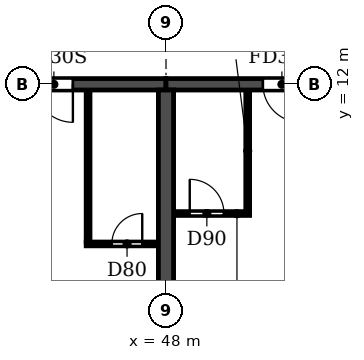
"""IFC4 building model, lengths in metres.
Left out: names, types, materials, properties, quantities, classifications, styles, units other than length and angle.
Written with IfcOpenShell. Run it as: python <this file> out.ifc"""

import sys

from ifc_helpers import new_model, si_unit, direction, frame, frame_2d, origin, place, context, subcontext, project, spatial, rectangle, extrude, element, fill, save


model = new_model("IFC4")
c1 = context("Model", 3, precision=1e-05, world=origin(), true_north=direction((0.0, 1.0)))
c2 = subcontext(c1, "Body", "Model", "MODEL_VIEW")
j1 = project(units=[si_unit("LENGTHUNIT", "METRE"), si_unit("PLANEANGLEUNIT", "RADIAN")], contexts=[c1])
p1 = place(None, origin())
s1 = spatial("IfcSite", under=j1, at=p1, CompositionType="ELEMENT")
p2 = place(p1, origin())
s2 = spatial("IfcBuilding", under=s1, at=p2, CompositionType="ELEMENT")
p3 = place(p2, frame((0.0, 0.0, 33.3)))
s3 = spatial("IfcBuildingStorey", under=s2, at=p3, CompositionType="ELEMENT", Elevation=33.3)
p4 = place(p3, frame((48.0, 0.2, 0.0), z_axis=(0.0, 0.0, 1.0), x_axis=(0.0, 1.0, 0.0)))
e1 = element("IfcWall", 1, at=p4, inside=s3, PredefinedType="SHEAR", context=c2, shape_type="SweptSolid", body=[
    extrude(rectangle(XDim=11.65, YDim=0.4, at=frame_2d((5.825, 0.0))), origin(), (0.0, 0.0, 1.0), 3.05),
])
p5 = place(p3, frame((42.0, 12.0, 0.0), z_axis=(0.0, 0.0, 1.0), x_axis=(1.0, 0.0, 0.0)))
e2 = element("IfcWall", 2, at=p5, inside=s3, PredefinedType="SHEAR", context=c2, shape_type="SweptSolid", body=[
    extrude(rectangle(XDim=6.0, YDim=0.3, at=frame_2d((3.0, 0.0))), origin(), (0.0, 0.0, 1.0), 2.45),
])
p6 = place(p5, frame((2.55, 0.0, 0.0)))
e3 = element("IfcOpeningElement", 3, at=p6, cuts=e2, PredefinedType="OPENING", context=c2, shape_type="SweptSolid", body=[
    extrude(rectangle(XDim=1.0, YDim=2.1, at=frame_2d((0.5, 1.05))), frame((0.0, 0.16, 0.0), z_axis=(0.0, -1.0, 0.0), x_axis=(1.0, 0.0, 0.0)), (0.0, 0.0, 1.0), 0.32),
])
p7 = place(p3, frame((48.0, 12.0, 0.0), z_axis=(0.0, 0.0, 1.0), x_axis=(1.0, 0.0, 0.0)))
e4 = element("IfcWall", 4, at=p7, inside=s3, PredefinedType="SHEAR", context=c2, shape_type="SweptSolid", body=[
    extrude(rectangle(XDim=6.0, YDim=0.3, at=frame_2d((3.0, 0.0))), origin(), (0.0, 0.0, 1.0), 2.45),
])
p8 = place(p7, frame((2.55, 0.0, 0.0)))
e5 = element("IfcOpeningElement", 5, at=p8, cuts=e4, PredefinedType="OPENING", context=c2, shape_type="SweptSolid", body=[
    extrude(rectangle(XDim=1.0, YDim=2.1, at=frame_2d((0.5, 1.05))), frame((0.0, 0.16, 0.0), z_axis=(0.0, -1.0, 0.0), x_axis=(1.0, 0.0, 0.0)), (0.0, 0.0, 1.0), 0.32),
])
p9 = place(p3, frame((45.9, 7.8, 0.0), z_axis=(0.0, 0.0, 1.0), x_axis=(1.0, 0.0, 0.0)))
e6 = element("IfcWall", 6, at=p9, inside=s3, PredefinedType="PARTITIONING", context=c2, shape_type="SweptSolid", body=[
    extrude(rectangle(XDim=1.89, YDim=0.1, at=frame_2d((0.945, 0.0))), origin(), (0.0, 0.0, 1.0), 3.05),
])
p10 = place(p9, frame((0.675, 0.0, 0.0)))
e7 = element("IfcOpeningElement", 7, at=p10, cuts=e6, PredefinedType="OPENING", context=c2, shape_type="SweptSolid", body=[
    extrude(rectangle(XDim=0.8, YDim=2.1, at=frame_2d((0.4, 1.05))), frame((0.0, 0.06, 0.0), z_axis=(0.0, -1.0, 0.0), x_axis=(1.0, 0.0, 0.0)), (0.0, 0.0, 1.0), 0.12),
])
p11 = place(p3, frame((48.21, 8.6, 0.0), z_axis=(0.0, 0.0, 1.0), x_axis=(1.0, 0.0, 0.0)))
e8 = element("IfcWall", 8, at=p11, inside=s3, PredefinedType="PARTITIONING", context=c2, shape_type="SweptSolid", body=[
    extrude(rectangle(XDim=1.99, YDim=0.1, at=frame_2d((0.995, 0.0))), origin(), (0.0, 0.0, 1.0), 3.05),
])
p12 = place(p11, frame((0.415, 0.0, 0.0)))
e9 = element("IfcOpeningElement", 9, at=p12, cuts=e8, PredefinedType="OPENING", context=c2, shape_type="SweptSolid", body=[
    extrude(rectangle(XDim=0.9, YDim=2.1, at=frame_2d((0.45, 1.05))), frame((0.0, 0.06, 0.0), z_axis=(0.0, -1.0, 0.0), x_axis=(1.0, 0.0, 0.0)), (0.0, 0.0, 1.0), 0.12),
])
p13 = place(p3, frame((45.95, 7.85, 0.0), z_axis=(0.0, 0.0, 1.0), x_axis=(0.0, 1.0, 0.0)))
e10 = element("IfcWall", 10, at=p13, inside=s3, PredefinedType="PARTITIONING", context=c2, shape_type="SweptSolid", body=[
    extrude(rectangle(XDim=3.99, YDim=0.1, at=frame_2d((1.995, 0.0))), origin(), (0.0, 0.0, 1.0), 3.05),
])
p14 = place(p3, frame((50.15, 8.65, 0.0), z_axis=(0.0, 0.0, 1.0), x_axis=(0.0, 1.0, 0.0)))
e11 = element("IfcWall", 11, at=p14, inside=s3, PredefinedType="PARTITIONING", context=c2, shape_type="SweptSolid", body=[
    extrude(rectangle(XDim=3.19, YDim=0.1, at=frame_2d((1.595, 0.0))), origin(), (0.0, 0.0, 1.0), 3.05),
])
p15 = place(p6, frame((1.0, 0.0, 0.0), z_axis=(0.0, 0.0, 1.0), x_axis=(-1.0, 0.0, 0.0)))
e12 = element("IfcDoor", 12, at=p15, inside=s3, OperationType="SINGLE_SWING_LEFT", PredefinedType="DOOR", context=c2, shape_type="SweptSolid", body=[
    extrude(rectangle(XDim=1.0, YDim=2.1, at=frame_2d((0.5, 1.05))), frame((0.0, 0.025, 0.0), z_axis=(0.0, -1.0, 0.0), x_axis=(1.0, 0.0, 0.0)), (0.0, 0.0, 1.0), 0.05),
])
fill(e3, e12)
p16 = place(p10, origin())
e13 = element("IfcDoor", 13, at=p16, inside=s3, OperationType="SINGLE_SWING_RIGHT", PredefinedType="DOOR", context=c2, shape_type="SweptSolid", body=[
    extrude(rectangle(XDim=0.8, YDim=2.1, at=frame_2d((0.4, 1.05))), frame((0.0, 0.025, 0.0), z_axis=(0.0, -1.0, 0.0), x_axis=(1.0, 0.0, 0.0)), (0.0, 0.0, 1.0), 0.05),
])
fill(e7, e13)
p17 = place(p12, origin())
e14 = element("IfcDoor", 14, at=p17, inside=s3, OperationType="SINGLE_SWING_LEFT", PredefinedType="DOOR", context=c2, shape_type="SweptSolid", body=[
    extrude(rectangle(XDim=0.9, YDim=2.1, at=frame_2d((0.45, 1.05))), frame((0.0, 0.025, 0.0), z_axis=(0.0, -1.0, 0.0), x_axis=(1.0, 0.0, 0.0)), (0.0, 0.0, 1.0), 0.05),
])
fill(e9, e14)
p18 = place(p8, frame((1.0, 0.0, 0.0), z_axis=(0.0, 0.0, 1.0), x_axis=(-1.0, 0.0, 0.0)))
e15 = element("IfcDoor", 15, at=p18, inside=s3, OperationType="SINGLE_SWING_LEFT", PredefinedType="DOOR", context=c2, shape_type="SweptSolid", body=[
    extrude(rectangle(XDim=1.0, YDim=2.1, at=frame_2d((0.5, 1.05))), frame((0.0, 0.025, 0.0), z_axis=(0.0, -1.0, 0.0), x_axis=(1.0, 0.0, 0.0)), (0.0, 0.0, 1.0), 0.05),
])
fill(e5, e15)
save(model, sys.argv[1])
